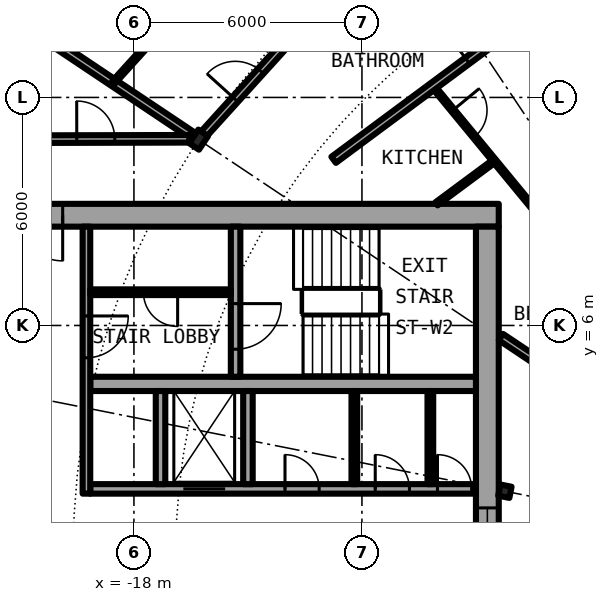
"""IFC4 building model, lengths in metres.
Left out: names, types, materials, properties, quantities, classifications, styles, units other than length and angle.
Written with IfcOpenShell. Run it as: python <this file> out.ifc"""

import sys

from ifc_helpers import new_model, si_unit, direction, frame, frame_2d, origin, origin_2d, place, context, subcontext, project, spatial, rectangle, i_section, extrude, element, fill, save


model = new_model("IFC4")
c1 = context("Model", 3, precision=1e-05, world=origin(), true_north=direction((0.0, 1.0)))
c2 = subcontext(c1, "Body", "Model", "MODEL_VIEW")
j1 = project(units=[si_unit("LENGTHUNIT", "METRE"), si_unit("PLANEANGLEUNIT", "RADIAN")], contexts=[c1])
p1 = place(None, origin())
s1 = spatial("IfcSite", under=j1, at=p1, CompositionType="ELEMENT")
p2 = place(p1, origin())
s2 = spatial("IfcBuilding", under=s1, at=p2, CompositionType="ELEMENT")
p3 = place(p2, frame((0.0, 0.0, 123.85)))
s3 = spatial("IfcBuildingStorey", under=s2, at=p3, CompositionType="ELEMENT", Elevation=123.85)
p4 = place(p3, frame((-16.297, 10.889, 0.0), z_axis=(0.0, 0.0, 1.0), x_axis=(-0.831469612303, 0.55557023302, 0.0)))
e1 = element("IfcColumn", 1, at=p4, inside=s3, PredefinedType="COLUMN", context=c2, shape_type="SweptSolid", body=[
    extrude(i_section(OverallWidth=0.307, OverallDepth=0.432, WebThickness=0.021, FlangeThickness=0.04, FilletRadius=0.027, at=origin_2d()), origin(), (0.0, 0.0, 1.0), 3.05),
])
p5 = place(p3, frame((-8.239, 1.639, 0.0), z_axis=(0.0, 0.0, 1.0), x_axis=(-0.980785280403, 0.195090322016, 0.0)))
e2 = element("IfcColumn", 2, at=p5, inside=s3, PredefinedType="COLUMN", context=c2, shape_type="SweptSolid", body=[
    extrude(i_section(OverallWidth=0.3, OverallDepth=0.3, WebThickness=0.011, FlangeThickness=0.019, FilletRadius=0.027, at=origin_2d()), origin(), (0.0, 0.0, 1.0), 3.05),
])
p6 = place(p3, frame((-8.4, 8.9, 0.0), z_axis=(0.0, 0.0, 1.0), x_axis=(-1.0, 0.0, 0.0)))
e3 = element("IfcWall", 3, at=p6, inside=s3, PredefinedType="SHEAR", context=c2, shape_type="SweptSolid", body=[
    extrude(rectangle(XDim=13.8, YDim=0.6, at=frame_2d((6.9, 0.0))), origin(), (0.0, 0.0, 1.0), 3.05),
])
p7 = place(p6, frame((11.475, 0.0, 0.0)))
e4 = element("IfcOpeningElement", 4, at=p7, cuts=e3, PredefinedType="OPENING", context=c2, shape_type="SweptSolid", body=[
    extrude(rectangle(XDim=1.2, YDim=2.3, at=frame_2d((0.6, 1.15))), frame((0.0, 0.31, 0.0), z_axis=(0.0, -1.0, 0.0), x_axis=(1.0, 0.0, 0.0)), (0.0, 0.0, 1.0), 0.62),
])
p8 = place(p3, frame((-8.7, 8.6, 0.0), z_axis=(0.0, 0.0, 1.0), x_axis=(0.0, -1.0, 0.0)))
e5 = element("IfcWall", 5, at=p8, inside=s3, PredefinedType="SHEAR", context=c2, shape_type="SweptSolid", body=[
    extrude(rectangle(XDim=17.2, YDim=0.6, at=frame_2d((8.6, 0.0))), origin(), (0.0, 0.0, 1.0), 3.05),
])
p9 = place(p8, frame((7.4, 0.0, 0.1)))
e6 = element("IfcOpeningElement", 6, at=p9, cuts=e5, PredefinedType="OPENING", context=c2, shape_type="SweptSolid", body=[
    extrude(rectangle(XDim=2.4, YDim=2.2, at=frame_2d((1.2, 1.1))), frame((0.0, 0.31, 0.0), z_axis=(0.0, -1.0, 0.0), x_axis=(1.0, 0.0, 0.0)), (0.0, 0.0, 1.0), 0.62),
])
p10 = place(p3, frame((-19.15, 1.7, 0.0), z_axis=(0.0, 0.0, 1.0), x_axis=(1.0, 0.0, 0.0)))
e7 = element("IfcWall", 7, at=p10, inside=s3, PredefinedType="SHEAR", context=c2, shape_type="SweptSolid", body=[
    extrude(rectangle(XDim=10.15, YDim=0.25, at=frame_2d((5.075, 0.0))), origin(), (0.0, 0.0, 1.0), 3.05),
])
p11 = place(p10, frame((2.45, 0.0, 0.0)))
e8 = element("IfcOpeningElement", 8, at=p11, cuts=e7, PredefinedType="OPENING", context=c2, shape_type="SweptSolid", body=[
    extrude(rectangle(XDim=1.1, YDim=2.3, at=frame_2d((0.55, 1.15))), frame((0.0, 0.135, 0.0), z_axis=(0.0, -1.0, 0.0), x_axis=(1.0, 0.0, 0.0)), (0.0, 0.0, 1.0), 0.27),
])
p12 = place(p10, frame((9.137, 0.0, 0.0)))
e9 = element("IfcOpeningElement", 9, at=p12, cuts=e7, PredefinedType="OPENING", context=c2, shape_type="SweptSolid", body=[
    extrude(rectangle(XDim=0.9, YDim=2.3, at=frame_2d((0.45, 1.15))), frame((0.0, 0.135, 0.0), z_axis=(0.0, -1.0, 0.0), x_axis=(1.0, 0.0, 0.0)), (0.0, 0.0, 1.0), 0.27),
])
p13 = place(p10, frame((7.5, 0.0, 0.0)))
e10 = element("IfcOpeningElement", 10, at=p13, cuts=e7, PredefinedType="OPENING", context=c2, shape_type="SweptSolid", body=[
    extrude(rectangle(XDim=0.9, YDim=2.3, at=frame_2d((0.45, 1.15))), frame((0.0, 0.135, 0.0), z_axis=(0.0, -1.0, 0.0), x_axis=(1.0, 0.0, 0.0)), (0.0, 0.0, 1.0), 0.27),
])
p14 = place(p10, frame((5.125, 0.0, 0.0)))
e11 = element("IfcOpeningElement", 11, at=p14, cuts=e7, PredefinedType="OPENING", context=c2, shape_type="SweptSolid", body=[
    extrude(rectangle(XDim=0.9, YDim=2.3, at=frame_2d((0.45, 1.15))), frame((0.0, 0.135, 0.0), z_axis=(0.0, -1.0, 0.0), x_axis=(1.0, 0.0, 0.0)), (0.0, 0.0, 1.0), 0.27),
])
p15 = place(p3, frame((-9.0, 4.462, 0.0), z_axis=(0.0, 0.0, 1.0), x_axis=(-1.0, 0.0, 0.0)))
e12 = element("IfcWall", 12, at=p15, inside=s3, PredefinedType="SHEAR", context=c2, shape_type="SweptSolid", body=[
    extrude(rectangle(XDim=10.15, YDim=0.375, at=frame_2d((5.075, 0.0))), origin(), (0.0, 0.0, 1.0), 3.05),
])
p16 = place(p3, frame((-15.325, 8.6, 0.0), z_axis=(0.0, 0.0, 1.0), x_axis=(0.0, -1.0, 0.0)))
e13 = element("IfcWall", 13, at=p16, inside=s3, PredefinedType="SHEAR", context=c2, shape_type="SweptSolid", body=[
    extrude(rectangle(XDim=3.95, YDim=0.25, at=frame_2d((1.975, 0.0))), origin(), (0.0, 0.0, 1.0), 3.05),
])
p17 = place(p16, frame((2.025, 0.0, 0.0)))
e14 = element("IfcOpeningElement", 14, at=p17, cuts=e13, PredefinedType="OPENING", context=c2, shape_type="SweptSolid", body=[
    extrude(rectangle(XDim=1.2, YDim=2.3, at=frame_2d((0.6, 1.15))), frame((0.0, 0.135, 0.0), z_axis=(0.0, -1.0, 0.0), x_axis=(1.0, 0.0, 0.0)), (0.0, 0.0, 1.0), 0.27),
])
for number, where, z_axis, x_axis in (
    (15, (-15.0, 1.825, 0.0), (0.0, 0.0, 1.0), (0.0, 1.0, 0.0)),
    (16, (-17.3, 1.825, 0.0), (0.0, 0.0, 1.0), (0.0, 1.0, 0.0)),
):
    element("IfcWall", number, at=place(p3, frame(where, z_axis=z_axis, x_axis=x_axis)), inside=s3, PredefinedType="SOLIDWALL", context=c2, shape_type="SweptSolid", body=[
        extrude(rectangle(XDim=2.45, YDim=0.25, at=frame_2d((1.225, 0.0))), origin(), (0.0, 0.0, 1.0), 2.7),
    ])
p18 = place(p3, frame((-19.25, 8.6, 0.0), z_axis=(0.0, 0.0, 1.0), x_axis=(0.0, -1.0, 0.0)))
e17 = element("IfcWall", 17, at=p18, inside=s3, PredefinedType="SOLIDWALL", context=c2, shape_type="SweptSolid", body=[
    extrude(rectangle(XDim=7.025, YDim=0.2, at=frame_2d((3.513, 0.0))), origin(), (0.0, 0.0, 1.0), 2.7),
])
p19 = place(p18, frame((2.35, 0.0, 0.0)))
e18 = element("IfcOpeningElement", 18, at=p19, cuts=e17, PredefinedType="OPENING", context=c2, shape_type="SweptSolid", body=[
    extrude(rectangle(XDim=1.1, YDim=2.3, at=frame_2d((0.55, 1.15))), frame((0.0, 0.11, 0.0), z_axis=(0.0, -1.0, 0.0), x_axis=(1.0, 0.0, 0.0)), (0.0, 0.0, 1.0), 0.22),
])
for number, where, z_axis, x_axis in (
    (19, (-10.2, 1.825, 0.0), (0.0, 0.0, 1.0), (0.0, 1.0, 0.0)),
    (20, (-12.2, 1.825, 0.0), (0.0, 0.0, 1.0), (0.0, 1.0, 0.0)),
):
    element("IfcWall", number, at=place(p3, frame(where, z_axis=z_axis, x_axis=x_axis)), inside=s3, PredefinedType="PARTITIONING", context=c2, shape_type="SweptSolid", body=[
        extrude(rectangle(XDim=2.45, YDim=0.15, at=frame_2d((1.225, 0.0))), origin(), (0.0, 0.0, 1.0), 2.7),
    ])
p20 = place(p3, frame((-15.45, 6.875, 0.0), z_axis=(0.0, 0.0, 1.0), x_axis=(-1.0, 0.0, 0.0)))
e21 = element("IfcWall", 21, at=p20, inside=s3, PredefinedType="PARTITIONING", context=c2, shape_type="SweptSolid", body=[
    extrude(rectangle(XDim=3.7, YDim=0.15, at=frame_2d((1.85, 0.0))), origin(), (0.0, 0.0, 1.0), 2.7),
])
p21 = place(p20, frame((1.4, 0.0, 0.0)))
e22 = element("IfcOpeningElement", 22, at=p21, cuts=e21, PredefinedType="OPENING", context=c2, shape_type="SweptSolid", body=[
    extrude(rectangle(XDim=0.9, YDim=2.3, at=frame_2d((0.45, 1.15))), frame((0.0, 0.085, 0.0), z_axis=(0.0, -1.0, 0.0), x_axis=(1.0, 0.0, 0.0)), (0.0, 0.0, 1.0), 0.17),
])
p22 = place(p3, frame((-22.595, 15.098, 0.0), z_axis=(0.0, 0.0, 1.0), x_axis=(0.831406593008, -0.555664536482, 0.0)))
e23 = element("IfcWall", 23, at=p22, inside=s3, PredefinedType="PARTITIONING", context=c2, shape_type="SweptSolid", body=[
    extrude(rectangle(XDim=7.358, YDim=0.2, at=frame_2d((3.679, 0.0))), origin(), (0.0, 0.0, 1.0), 2.7),
])
p23 = place(p3, frame((-10.132, 12.296, 0.0), z_axis=(0.0, 0.0, 1.0), x_axis=(0.635976043025, -0.771708800454, 0.0)))
e24 = element("IfcWall", 24, at=p23, inside=s3, PredefinedType="PARTITIONING", context=c2, shape_type="SweptSolid", body=[
    extrude(rectangle(XDim=8.213, YDim=0.1, at=frame_2d((4.106, 0.0))), origin(), (0.0, 0.0, 1.0), 2.7),
])
p24 = place(p23, frame((0.823, 0.0, 0.0)))
e25 = element("IfcOpeningElement", 25, at=p24, cuts=e24, PredefinedType="OPENING", context=c2, shape_type="SweptSolid", body=[
    extrude(rectangle(XDim=0.9, YDim=2.3, at=frame_2d((0.45, 1.15))), frame((0.0, 0.06, 0.0), z_axis=(0.0, -1.0, 0.0), x_axis=(1.0, 0.0, 0.0)), (0.0, 0.0, 1.0), 0.12),
])
p25 = place(p23, frame((4.929, 0.0, 0.0)))
e26 = element("IfcOpeningElement", 26, at=p25, cuts=e24, PredefinedType="OPENING", context=c2, shape_type="SweptSolid", body=[
    extrude(rectangle(XDim=0.9, YDim=2.3, at=frame_2d((0.45, 1.15))), frame((0.0, 0.06, 0.0), z_axis=(0.0, -1.0, 0.0), x_axis=(1.0, 0.0, 0.0)), (0.0, 0.0, 1.0), 0.12),
])
p26 = place(p3, frame((-6.513, 4.472, 0.0), z_axis=(0.0, 0.0, 1.0), x_axis=(-0.831333375071, 0.555774072347, 0.0)))
e27 = element("IfcWall", 27, at=p26, inside=s3, PredefinedType="PARTITIONING", context=c2, shape_type="SweptSolid", body=[
    extrude(rectangle(XDim=2.203, YDim=0.2, at=frame_2d((1.101, 0.0))), origin(), (0.0, 0.0, 1.0), 2.7),
])
p27 = place(p3, frame((-21.675, 10.9, 0.0), z_axis=(0.0, 0.0, 1.0), x_axis=(0.999997173357, 0.002377662213, 0.0)))
e28 = element("IfcWall", 28, at=p27, inside=s3, PredefinedType="PARTITIONING", context=c2, shape_type="SweptSolid", body=[
    extrude(rectangle(XDim=5.134, YDim=0.2, at=frame_2d((2.567, 0.0))), origin(), (0.0, 0.0, 1.0), 2.7),
])
p28 = place(p27, frame((2.171, 0.0, 0.0)))
e29 = element("IfcOpeningElement", 29, at=p28, cuts=e28, PredefinedType="OPENING", context=c2, shape_type="SweptSolid", body=[
    extrude(rectangle(XDim=1.0, YDim=2.3, at=frame_2d((0.5, 1.15))), frame((0.0, 0.11, 0.0), z_axis=(0.0, -1.0, 0.0), x_axis=(1.0, 0.0, 0.0)), (0.0, 0.0, 1.0), 0.22),
])
p29 = place(p3, frame((-10.039, 9.2, 0.0), z_axis=(0.0, 0.0, 1.0), x_axis=(0.803149591038, 0.595777420196, 0.0)))
e30 = element("IfcWall", 30, at=p29, inside=s3, PredefinedType="PARTITIONING", context=c2, shape_type="SweptSolid", body=[
    extrude(rectangle(XDim=1.9, YDim=0.1, at=frame_2d((0.95, 0.0))), origin(), (0.0, 0.0, 1.0), 2.7),
])
p30 = place(p3, frame((-12.745, 10.358, 0.0), z_axis=(0.0, 0.0, 1.0), x_axis=(0.803191461888, 0.595720971219, 0.0)))
e31 = element("IfcWall", 31, at=p30, inside=s3, PredefinedType="PARTITIONING", context=c2, shape_type="SweptSolid", body=[
    extrude(rectangle(XDim=9.76, YDim=0.2, at=frame_2d((4.88, 0.0))), origin(), (0.0, 0.0, 1.0), 2.7),
])
p31 = place(p30, frame((4.38, 0.0, 0.0)))
e32 = element("IfcOpeningElement", 32, at=p31, cuts=e31, PredefinedType="OPENING", context=c2, shape_type="SweptSolid", body=[
    extrude(rectangle(XDim=1.0, YDim=2.3, at=frame_2d((0.5, 1.15))), frame((0.0, 0.11, 0.0), z_axis=(0.0, -1.0, 0.0), x_axis=(1.0, 0.0, 0.0)), (0.0, 0.0, 1.0), 0.22),
])
p32 = place(p3, frame((-16.192, 11.004, 0.0), z_axis=(0.0, 0.0, 1.0), x_axis=(0.671481997275, 0.741020868354, 0.0)))
e33 = element("IfcWall", 33, at=p32, inside=s3, PredefinedType="PARTITIONING", context=c2, shape_type="SweptSolid", body=[
    extrude(rectangle(XDim=5.596, YDim=0.2, at=frame_2d((2.798, 0.0))), origin(), (0.0, 0.0, 1.0), 2.39),
])
p33 = place(p32, frame((1.277, 0.0, 0.0)))
e34 = element("IfcOpeningElement", 34, at=p33, cuts=e33, PredefinedType="OPENING", context=c2, shape_type="SweptSolid", body=[
    extrude(rectangle(XDim=1.0, YDim=2.3, at=frame_2d((0.5, 1.15))), frame((0.0, 0.11, 0.0), z_axis=(0.0, -1.0, 0.0), x_axis=(1.0, 0.0, 0.0)), (0.0, 0.0, 1.0), 0.22),
])
p34 = place(p3, frame((-18.538, 12.394, 0.0), z_axis=(0.0, 0.0, 1.0), x_axis=(0.67169789574, 0.740825172937, 0.0)))
e35 = element("IfcWall", 35, at=p34, inside=s3, PredefinedType="PARTITIONING", context=c2, shape_type="SweptSolid", body=[
    extrude(rectangle(XDim=2.183, YDim=0.1, at=frame_2d((1.091, 0.0))), origin(), (0.0, 0.0, 1.0), 2.7),
])
p35 = place(p11, origin())
e36 = element("IfcDoor", 36, at=p35, inside=s3, OperationType="DOUBLE_DOOR_SLIDING", PredefinedType="DOOR", context=c2, shape_type="SweptSolid", body=[
    extrude(rectangle(XDim=1.1, YDim=2.3, at=frame_2d((0.55, 1.15))), frame((0.0, 0.025, 0.0), z_axis=(0.0, -1.0, 0.0), x_axis=(1.0, 0.0, 0.0)), (0.0, 0.0, 1.0), 0.05),
])
fill(e8, e36)
p36 = place(p12, origin())
e37 = element("IfcDoor", 37, at=p36, inside=s3, OperationType="SINGLE_SWING_LEFT", PredefinedType="DOOR", context=c2, shape_type="SweptSolid", body=[
    extrude(rectangle(XDim=0.9, YDim=2.3, at=frame_2d((0.45, 1.15))), frame((0.0, 0.025, 0.0), z_axis=(0.0, -1.0, 0.0), x_axis=(1.0, 0.0, 0.0)), (0.0, 0.0, 1.0), 0.05),
])
fill(e9, e37)
p37 = place(p13, origin())
e38 = element("IfcDoor", 38, at=p37, inside=s3, OperationType="SINGLE_SWING_LEFT", PredefinedType="DOOR", context=c2, shape_type="SweptSolid", body=[
    extrude(rectangle(XDim=0.9, YDim=2.3, at=frame_2d((0.45, 1.15))), frame((0.0, 0.025, 0.0), z_axis=(0.0, -1.0, 0.0), x_axis=(1.0, 0.0, 0.0)), (0.0, 0.0, 1.0), 0.05),
])
fill(e10, e38)
p38 = place(p14, origin())
e39 = element("IfcDoor", 39, at=p38, inside=s3, OperationType="SINGLE_SWING_LEFT", PredefinedType="DOOR", context=c2, shape_type="SweptSolid", body=[
    extrude(rectangle(XDim=0.9, YDim=2.3, at=frame_2d((0.45, 1.15))), frame((0.0, 0.025, 0.0), z_axis=(0.0, -1.0, 0.0), x_axis=(1.0, 0.0, 0.0)), (0.0, 0.0, 1.0), 0.05),
])
fill(e11, e39)
p39 = place(p21, origin())
e40 = element("IfcDoor", 40, at=p39, inside=s3, OperationType="SINGLE_SWING_LEFT", PredefinedType="DOOR", context=c2, shape_type="SweptSolid", body=[
    extrude(rectangle(XDim=0.9, YDim=2.3, at=frame_2d((0.45, 1.15))), frame((0.0, 0.025, 0.0), z_axis=(0.0, -1.0, 0.0), x_axis=(1.0, 0.0, 0.0)), (0.0, 0.0, 1.0), 0.05),
])
fill(e22, e40)
p40 = place(p17, origin())
e41 = element("IfcDoor", 41, at=p40, inside=s3, OperationType="SINGLE_SWING_LEFT", PredefinedType="DOOR", context=c2, shape_type="SweptSolid", body=[
    extrude(rectangle(XDim=1.2, YDim=2.3, at=frame_2d((0.6, 1.15))), frame((0.0, 0.025, 0.0), z_axis=(0.0, -1.0, 0.0), x_axis=(1.0, 0.0, 0.0)), (0.0, 0.0, 1.0), 0.05),
])
fill(e14, e41)
p41 = place(p19, origin())
e42 = element("IfcDoor", 42, at=p41, inside=s3, OperationType="SINGLE_SWING_RIGHT", PredefinedType="DOOR", context=c2, shape_type="SweptSolid", body=[
    extrude(rectangle(XDim=1.1, YDim=2.3, at=frame_2d((0.55, 1.15))), frame((0.0, 0.025, 0.0), z_axis=(0.0, -1.0, 0.0), x_axis=(1.0, 0.0, 0.0)), (0.0, 0.0, 1.0), 0.05),
])
fill(e18, e42)
p42 = place(p7, origin())
e43 = element("IfcDoor", 43, at=p42, inside=s3, OperationType="SINGLE_SWING_LEFT", PredefinedType="DOOR", context=c2, shape_type="SweptSolid", body=[
    extrude(rectangle(XDim=1.2, YDim=2.3, at=frame_2d((0.6, 1.15))), frame((0.0, 0.025, 0.0), z_axis=(0.0, -1.0, 0.0), x_axis=(1.0, 0.0, 0.0)), (0.0, 0.0, 1.0), 0.05),
])
fill(e4, e43)
p43 = place(p9, origin())
e44 = element("IfcWindow", 44, at=p43, inside=s3, PartitioningType="SINGLE_PANEL", PredefinedType="WINDOW", context=c2, shape_type="SweptSolid", body=[
    extrude(rectangle(XDim=2.4, YDim=2.2, at=frame_2d((1.2, 1.1))), frame((0.0, 0.03, 0.0), z_axis=(0.0, -1.0, 0.0), x_axis=(1.0, 0.0, 0.0)), (0.0, 0.0, 1.0), 0.06),
])
fill(e6, e44)
p44 = place(p33, origin())
e45 = element("IfcDoor", 45, at=p44, inside=s3, OperationType="SINGLE_SWING_LEFT", PredefinedType="DOOR", context=c2, shape_type="SweptSolid", body=[
    extrude(rectangle(XDim=1.0, YDim=2.3, at=frame_2d((0.5, 1.15))), frame((0.0, 0.025, 0.0), z_axis=(0.0, -1.0, 0.0), x_axis=(1.0, 0.0, 0.0)), (0.0, 0.0, 1.0), 0.05),
])
fill(e34, e45)
p45 = place(p31, origin())
e46 = element("IfcDoor", 46, at=p45, inside=s3, OperationType="SINGLE_SWING_RIGHT", PredefinedType="DOOR", context=c2, shape_type="SweptSolid", body=[
    extrude(rectangle(XDim=1.0, YDim=2.3, at=frame_2d((0.5, 1.15))), frame((0.0, 0.025, 0.0), z_axis=(0.0, -1.0, 0.0), x_axis=(1.0, 0.0, 0.0)), (0.0, 0.0, 1.0), 0.05),
])
fill(e32, e46)
p46 = place(p24, origin())
e47 = element("IfcDoor", 47, at=p46, inside=s3, OperationType="SINGLE_SWING_LEFT", PredefinedType="DOOR", context=c2, shape_type="SweptSolid", body=[
    extrude(rectangle(XDim=0.9, YDim=2.3, at=frame_2d((0.45, 1.15))), frame((0.0, 0.025, 0.0), z_axis=(0.0, -1.0, 0.0), x_axis=(1.0, 0.0, 0.0)), (0.0, 0.0, 1.0), 0.05),
])
fill(e25, e47)
p47 = place(p28, origin())
e48 = element("IfcDoor", 48, at=p47, inside=s3, OperationType="SINGLE_SWING_RIGHT", PredefinedType="DOOR", context=c2, shape_type="SweptSolid", body=[
    extrude(rectangle(XDim=1.0, YDim=2.3, at=frame_2d((0.5, 1.15))), frame((0.0, 0.025, 0.0), z_axis=(0.0, -1.0, 0.0), x_axis=(1.0, 0.0, 0.0)), (0.0, 0.0, 1.0), 0.05),
])
fill(e29, e48)
save(model, sys.argv[1])
